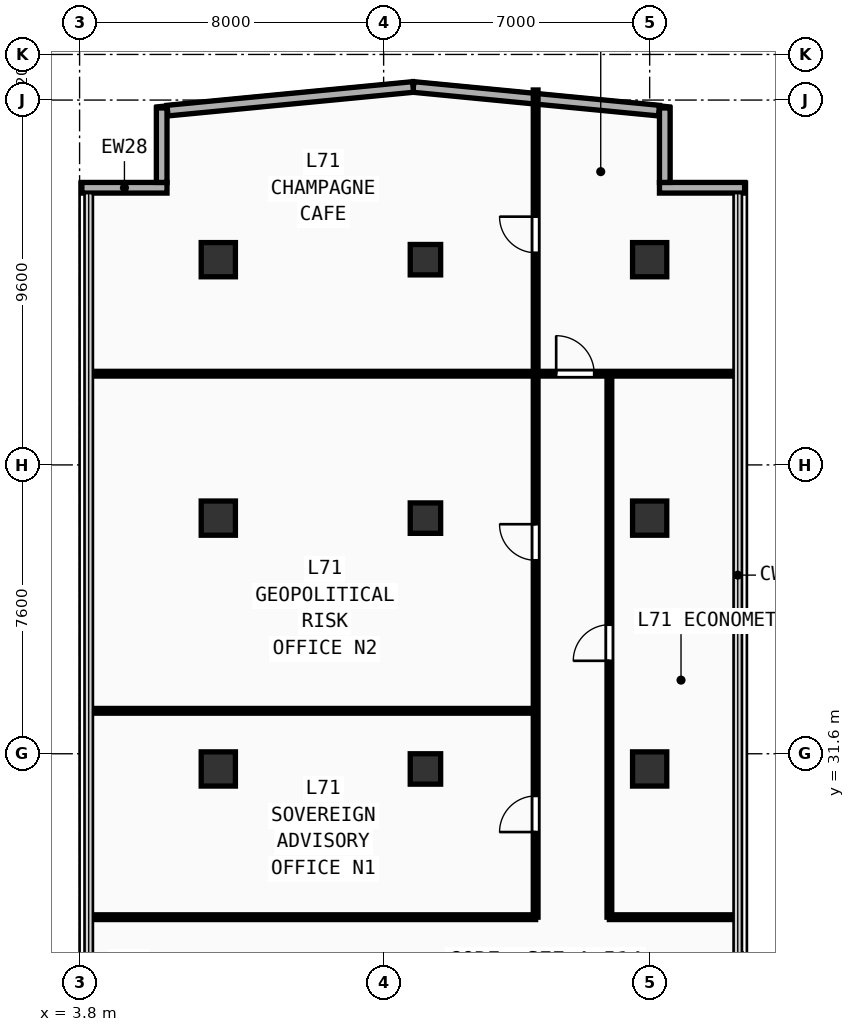
"""IFC4 building model, lengths in metres.
Left out: names, types, materials, properties, quantities, classifications, styles, units other than length and angle.
Written with IfcOpenShell. Run it as: python <this file> out.ifc"""

import sys

from ifc_helpers import new_model, si_unit, direction, frame, frame_2d, origin, origin_2d, place, context, subcontext, project, spatial, rectangle, extrude, element, fill, save


model = new_model("IFC4")
c1 = context("Model", 3, precision=1e-05, world=origin(), true_north=direction((0.0, 1.0)))
c2 = subcontext(c1, "Body", "Model", "MODEL_VIEW")
j1 = project(units=[si_unit("LENGTHUNIT", "METRE"), si_unit("PLANEANGLEUNIT", "RADIAN")], contexts=[c1])
p1 = place(None, origin())
s1 = spatial("IfcSite", under=j1, at=p1, CompositionType="ELEMENT")
p2 = place(p1, origin())
s2 = spatial("IfcBuilding", under=s1, at=p2, CompositionType="ELEMENT")
p3 = place(p2, frame((0.0, 0.0, 278.0)))
s3 = spatial("IfcBuildingStorey", under=s2, at=p3, CompositionType="ELEMENT", Elevation=278.0)
for number, where, z_axis, x_axis in (
    (1, (7.45, 31.2, 0.0), (0.0, 0.0, 1.0), (1.0, 0.0, 0.0)),
    (2, (7.45, 37.8, 0.0), (0.0, 0.0, 1.0), (1.0, 0.0, 0.0)),
    (3, (7.45, 44.6, 0.0), (0.0, 0.0, 1.0), (1.0, 0.0, 0.0)),
    (4, (18.8, 31.2, 0.0), (0.0, 0.0, 1.0), (1.0, 0.0, 0.0)),
    (5, (18.8, 37.8, 0.0), (0.0, 0.0, 1.0), (1.0, 0.0, 0.0)),
    (6, (18.8, 44.6, 0.0), (0.0, 0.0, 1.0), (1.0, 0.0, 0.0)),
):
    element("IfcColumn", number, at=place(p3, frame(where, z_axis=z_axis, x_axis=x_axis)), inside=s3, PredefinedType="COLUMN", context=c2, shape_type="SweptSolid", body=[
        extrude(rectangle(XDim=0.9, YDim=0.9, at=origin_2d()), origin(), (0.0, 0.0, 1.0), 3.56),
    ])
for number, where, z_axis, x_axis in (
    (7, (12.9, 31.2, 0.0), (0.0, 0.0, 1.0), (1.0, 0.0, 0.0)),
    (8, (12.9, 37.8, 0.0), (0.0, 0.0, 1.0), (1.0, 0.0, 0.0)),
    (9, (12.9, 44.6, 0.0), (0.0, 0.0, 1.0), (1.0, 0.0, 0.0)),
):
    element("IfcColumn", number, at=place(p3, frame(where, z_axis=z_axis, x_axis=x_axis)), inside=s3, PredefinedType="COLUMN", context=c2, shape_type="SweptSolid", body=[
        extrude(rectangle(XDim=0.8, YDim=0.8, at=origin_2d()), origin(), (0.0, 0.0, 1.0), 3.56),
    ])
p4 = place(p3, frame((19.058, 46.493, 0.0), z_axis=(0.0, 0.0, 1.0), x_axis=(1.0, 0.0, 0.0)))
e10 = element("IfcWall", 10, at=p4, inside=s3, PredefinedType="SOLIDWALL", context=c2, shape_type="SweptSolid", body=[
    extrude(rectangle(XDim=2.24, YDim=0.28, at=frame_2d((1.12, 0.0))), origin(), (0.0, 0.0, 1.0), 3.56),
])
p5 = place(p3, frame((19.198, 46.633, 0.0), z_axis=(0.0, 0.0, 1.0), x_axis=(0.0, 1.0, 0.0)))
e11 = element("IfcWall", 11, at=p5, inside=s3, PredefinedType="SOLIDWALL", context=c2, shape_type="SweptSolid", body=[
    extrude(rectangle(XDim=1.96, YDim=0.28, at=frame_2d((0.98, 0.0))), origin(), (0.0, 0.0, 1.0), 3.56),
])
p6 = place(p3, frame((3.86, 46.493, 0.0), z_axis=(0.0, 0.0, 1.0), x_axis=(1.0, 0.0, 0.0)))
e12 = element("IfcWall", 12, at=p6, inside=s3, PredefinedType="SOLIDWALL", context=c2, shape_type="SweptSolid", body=[
    extrude(rectangle(XDim=2.24, YDim=0.28, at=frame_2d((1.12, 0.0))), origin(), (0.0, 0.0, 1.0), 3.56),
])
p7 = place(p3, frame((5.96, 46.633, 0.0), z_axis=(0.0, 0.0, 1.0), x_axis=(0.0, 1.0, 0.0)))
e13 = element("IfcWall", 13, at=p7, inside=s3, PredefinedType="SOLIDWALL", context=c2, shape_type="SweptSolid", body=[
    extrude(rectangle(XDim=1.96, YDim=0.28, at=frame_2d((0.98, 0.0))), origin(), (0.0, 0.0, 1.0), 3.56),
])
p8 = place(p3, frame((19.044, 48.522, 0.0), z_axis=(0.0, 0.0, 1.0), x_axis=(-0.99539978927, 0.095808452244, 0.0)))
e14 = element("IfcWall", 14, at=p8, inside=s3, PredefinedType="SOLIDWALL", context=c2, shape_type="SweptSolid", body=[
    extrude(rectangle(XDim=6.49, YDim=0.28, at=frame_2d((3.245, 0.0))), origin(), (0.0, 0.0, 1.0), 3.56),
])
p9 = place(p3, frame((12.574, 49.144, 0.0), z_axis=(0.0, 0.0, 1.0), x_axis=(-0.995399443962, -0.095812039748, 0.0)))
e15 = element("IfcWall", 15, at=p9, inside=s3, PredefinedType="SOLIDWALL", context=c2, shape_type="SweptSolid", body=[
    extrude(rectangle(XDim=6.49, YDim=0.28, at=frame_2d((3.245, 0.0))), origin(), (0.0, 0.0, 1.0), 3.56),
])
p10 = place(p3, frame((4.04, 27.3, 0.0), z_axis=(0.0, 0.0, 1.0), x_axis=(1.0, 0.0, 0.0)))
e16 = element("IfcWall", 16, at=p10, inside=s3, PredefinedType="PARTITIONING", context=c2, shape_type="SweptSolid", body=[
    extrude(rectangle(XDim=11.76, YDim=0.125, at=frame_2d((5.88, 0.0))), origin(), (0.0, 0.0, 1.0), 3.56),
])
p11 = place(p3, frame((15.8, 27.3, 0.0), z_axis=(0.0, 0.0, 1.0), x_axis=(0.0, 1.0, 0.0)))
e17 = element("IfcWall", 17, at=p11, inside=s3, PredefinedType="PARTITIONING", context=c2, shape_type="SweptSolid", body=[
    extrude(rectangle(XDim=14.3, YDim=0.125, at=frame_2d((7.15, 0.0))), origin(), (0.0, 0.0, 1.0), 3.56),
])
p12 = place(p11, frame((2.24, 0.0, 0.0)))
e18 = element("IfcOpeningElement", 18, at=p12, cuts=e17, PredefinedType="OPENING", context=c2, shape_type="SweptSolid", body=[
    extrude(rectangle(XDim=0.95, YDim=2.15, at=frame_2d((0.475, 1.075))), frame((0.0, 0.073, 0.0), z_axis=(0.0, -1.0, 0.0), x_axis=(1.0, 0.0, 0.0)), (0.0, 0.0, 1.0), 0.145),
])
p13 = place(p11, frame((9.39, 0.0, 0.0)))
e19 = element("IfcOpeningElement", 19, at=p13, cuts=e17, PredefinedType="OPENING", context=c2, shape_type="SweptSolid", body=[
    extrude(rectangle(XDim=0.95, YDim=2.15, at=frame_2d((0.475, 1.075))), frame((0.0, 0.073, 0.0), z_axis=(0.0, -1.0, 0.0), x_axis=(1.0, 0.0, 0.0)), (0.0, 0.0, 1.0), 0.145),
])
p14 = place(p3, frame((4.04, 32.73, 0.0), z_axis=(0.0, 0.0, 1.0), x_axis=(1.0, 0.0, 0.0)))
e20 = element("IfcWall", 20, at=p14, inside=s3, PredefinedType="PARTITIONING", context=c2, shape_type="SweptSolid", body=[
    extrude(rectangle(XDim=11.76, YDim=0.125, at=frame_2d((5.88, 0.0))), origin(), (0.0, 0.0, 1.0), 3.56),
])
p15 = place(p3, frame((4.04, 41.6, 0.0), z_axis=(0.0, 0.0, 1.0), x_axis=(1.0, 0.0, 0.0)))
e21 = element("IfcWall", 21, at=p15, inside=s3, PredefinedType="PARTITIONING", context=c2, shape_type="SweptSolid", body=[
    extrude(rectangle(XDim=17.12, YDim=0.125, at=frame_2d((8.56, 0.0))), origin(), (0.0, 0.0, 1.0), 3.56),
])
p16 = place(p15, frame((12.3, 0.0, 0.0)))
e22 = element("IfcOpeningElement", 22, at=p16, cuts=e21, PredefinedType="OPENING", context=c2, shape_type="SweptSolid", body=[
    extrude(rectangle(XDim=1.0, YDim=2.2, at=frame_2d((0.5, 1.1))), frame((0.0, 0.073, 0.0), z_axis=(0.0, -1.0, 0.0), x_axis=(1.0, 0.0, 0.0)), (0.0, 0.0, 1.0), 0.145),
])
p17 = place(p3, frame((15.8, 41.6, 0.0), z_axis=(0.0, 0.0, 1.0), x_axis=(0.0, 1.0, 0.0)))
e23 = element("IfcWall", 23, at=p17, inside=s3, PredefinedType="PARTITIONING", context=c2, shape_type="SweptSolid", body=[
    extrude(rectangle(XDim=7.465, YDim=0.125, at=frame_2d((3.732, 0.0))), origin(), (0.0, 0.0, 1.0), 3.56),
])
p18 = place(p17, frame((3.182, 0.0, 0.0)))
e24 = element("IfcOpeningElement", 24, at=p18, cuts=e23, PredefinedType="OPENING", context=c2, shape_type="SweptSolid", body=[
    extrude(rectangle(XDim=0.95, YDim=2.15, at=frame_2d((0.475, 1.075))), frame((0.0, 0.073, 0.0), z_axis=(0.0, -1.0, 0.0), x_axis=(1.0, 0.0, 0.0)), (0.0, 0.0, 1.0), 0.145),
])
p19 = place(p3, frame((17.74, 27.3, 0.0), z_axis=(0.0, 0.0, 1.0), x_axis=(1.0, 0.0, 0.0)))
e25 = element("IfcWall", 25, at=p19, inside=s3, PredefinedType="PARTITIONING", context=c2, shape_type="SweptSolid", body=[
    extrude(rectangle(XDim=3.42, YDim=0.125, at=frame_2d((1.71, 0.0))), origin(), (0.0, 0.0, 1.0), 3.56),
])
p20 = place(p3, frame((17.74, 27.3, 0.0), z_axis=(0.0, 0.0, 1.0), x_axis=(0.0, 1.0, 0.0)))
e26 = element("IfcWall", 26, at=p20, inside=s3, PredefinedType="PARTITIONING", context=c2, shape_type="SweptSolid", body=[
    extrude(rectangle(XDim=14.3, YDim=0.125, at=frame_2d((7.15, 0.0))), origin(), (0.0, 0.0, 1.0), 3.56),
])
p21 = place(p20, frame((6.746, 0.0, 0.0)))
e27 = element("IfcOpeningElement", 27, at=p21, cuts=e26, PredefinedType="OPENING", context=c2, shape_type="SweptSolid", body=[
    extrude(rectangle(XDim=0.95, YDim=2.15, at=frame_2d((0.475, 1.075))), frame((0.0, 0.073, 0.0), z_axis=(0.0, -1.0, 0.0), x_axis=(1.0, 0.0, 0.0)), (0.0, 0.0, 1.0), 0.145),
])
p22 = place(p12, origin())
e28 = element("IfcDoor", 28, at=p22, inside=s3, OperationType="SINGLE_SWING_LEFT", PredefinedType="DOOR", context=c2, shape_type="SweptSolid", body=[
    extrude(rectangle(XDim=0.95, YDim=2.15, at=frame_2d((0.475, 1.075))), frame((0.0, 0.025, 0.0), z_axis=(0.0, -1.0, 0.0), x_axis=(1.0, 0.0, 0.0)), (0.0, 0.0, 1.0), 0.05),
])
fill(e18, e28)
p23 = place(p13, origin())
e29 = element("IfcDoor", 29, at=p23, inside=s3, OperationType="SINGLE_SWING_RIGHT", PredefinedType="DOOR", context=c2, shape_type="SweptSolid", body=[
    extrude(rectangle(XDim=0.95, YDim=2.15, at=frame_2d((0.475, 1.075))), frame((0.0, 0.025, 0.0), z_axis=(0.0, -1.0, 0.0), x_axis=(1.0, 0.0, 0.0)), (0.0, 0.0, 1.0), 0.05),
])
fill(e19, e29)
p24 = place(p16, origin())
e30 = element("IfcDoor", 30, at=p24, inside=s3, OperationType="SINGLE_SWING_LEFT", PredefinedType="DOOR", context=c2, shape_type="SweptSolid", body=[
    extrude(rectangle(XDim=1.0, YDim=2.2, at=frame_2d((0.5, 1.1))), frame((0.0, 0.025, 0.0), z_axis=(0.0, -1.0, 0.0), x_axis=(1.0, 0.0, 0.0)), (0.0, 0.0, 1.0), 0.05),
])
fill(e22, e30)
p25 = place(p18, origin())
e31 = element("IfcDoor", 31, at=p25, inside=s3, OperationType="SINGLE_SWING_RIGHT", PredefinedType="DOOR", context=c2, shape_type="SweptSolid", body=[
    extrude(rectangle(XDim=0.95, YDim=2.15, at=frame_2d((0.475, 1.075))), frame((0.0, 0.025, 0.0), z_axis=(0.0, -1.0, 0.0), x_axis=(1.0, 0.0, 0.0)), (0.0, 0.0, 1.0), 0.05),
])
fill(e24, e31)
p26 = place(p21, origin())
e32 = element("IfcDoor", 32, at=p26, inside=s3, OperationType="SINGLE_SWING_LEFT", PredefinedType="DOOR", context=c2, shape_type="SweptSolid", body=[
    extrude(rectangle(XDim=0.95, YDim=2.15, at=frame_2d((0.475, 1.075))), frame((0.0, 0.025, 0.0), z_axis=(0.0, -1.0, 0.0), x_axis=(1.0, 0.0, 0.0)), (0.0, 0.0, 1.0), 0.05),
])
fill(e27, e32)
save(model, sys.argv[1])
